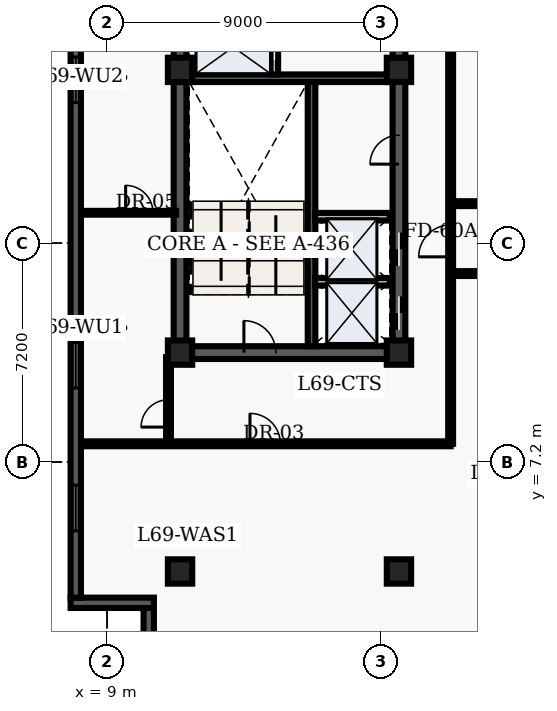
"""IFC4 building model, lengths in metres.
Left out: names, types, materials, properties, quantities, classifications, styles, units other than length and angle.
Written with IfcOpenShell. Run it as: python <this file> out.ifc"""

import sys

from ifc_helpers import new_model, entity, si_unit, converted_unit, direction, frame, origin_with_axes, origin_2d_with_axis, place, context, subcontext, project, spatial, polyline, rectangle, outline, extrude, element, fill, save


model = new_model("IFC4")
c1 = context("Model", 3, precision=1e-05, world=origin_with_axes(), true_north=direction((0.0, 1.0)))
c2 = subcontext(c1, "Body", "Model", "MODEL_VIEW")
j1 = project(units=[si_unit("LENGTHUNIT", "METRE"), converted_unit("PLANEANGLEUNIT", "DEGREE", entity("IfcPlaneAngleMeasure", 0.017), si_unit("PLANEANGLEUNIT", "RADIAN"), dimensions=[0, 0, 0, 0, 0, 0, 0])], contexts=[c1])
p1 = place(None, origin_with_axes())
s1 = spatial("IfcSite", under=j1, at=p1, CompositionType="ELEMENT")
p2 = place(p1, origin_with_axes())
s2 = spatial("IfcBuilding", under=s1, at=p2, CompositionType="ELEMENT")
p3 = place(p2, frame((0.0, 0.0, 280.2), z_axis=(0.0, 0.0, 1.0), x_axis=(1.0, 0.0, 0.0)))
s3 = spatial("IfcBuildingStorey", under=s2, at=p3, CompositionType="ELEMENT", Elevation=280.2)
p4 = place(p3, frame((11.4, 10.8, 0.0), z_axis=(0.0, 0.0, 1.0), x_axis=(0.0, 1.0, 0.0)))
e1 = element("IfcWall", 1, at=p4, inside=s3, PredefinedType="SHEAR", context=c2, shape_type="SweptSolid", body=[
    extrude(outline(polyline([(0.0, -0.21), (27.0, -0.21), (27.0, 0.21), (0.0, 0.21), (0.0, -0.21)])), origin_with_axes(), (0.0, 0.0, 1.0), 3.66),
])
p5 = place(p3, frame((11.4, 10.8, 0.0), z_axis=(0.0, 0.0, 1.0), x_axis=(1.0, 0.0, 0.0)))
e2 = element("IfcWall", 2, at=p5, inside=s3, PredefinedType="SHEAR", context=c2, shape_type="SweptSolid", body=[
    extrude(outline(polyline([(0.0, -0.21), (7.2, -0.21), (7.2, 0.21), (0.0, 0.21), (0.0, -0.21)])), origin_with_axes(), (0.0, 0.0, 1.0), 3.66),
])
p6 = place(p5, frame((2.625, 0.0, 0.0), z_axis=(0.0, 0.0, 1.0), x_axis=(1.0, 0.0, 0.0)))
e3 = element("IfcOpeningElement", 3, at=p6, cuts=e2, PredefinedType="OPENING", context=c2, shape_type="SweptSolid", body=[
    extrude(rectangle(XDim=1.05, YDim=0.44, at=origin_2d_with_axis()), origin_with_axes(), (0.0, 0.0, 1.0), 2.15),
])
p7 = place(p3, frame((18.6, 10.8, 0.0), z_axis=(0.0, 0.0, 1.0), x_axis=(0.0, 1.0, 0.0)))
e4 = element("IfcWall", 4, at=p7, inside=s3, PredefinedType="SHEAR", context=c2, shape_type="SweptSolid", body=[
    extrude(outline(polyline([(0.0, -0.21), (13.5, -0.21), (13.5, 0.21), (0.0, 0.21), (0.0, -0.21)])), origin_with_axes(), (0.0, 0.0, 1.0), 3.66),
])
p8 = place(p7, frame((1.3, 0.0, 0.0), z_axis=(0.0, 0.0, 1.0), x_axis=(1.0, 0.0, 0.0)))
e5 = element("IfcOpeningElement", 5, at=p8, cuts=e4, PredefinedType="OPENING", context=c2, shape_type="SweptSolid", body=[
    extrude(rectangle(XDim=1.1, YDim=0.44, at=origin_2d_with_axis()), origin_with_axes(), (0.0, 0.0, 1.0), 2.15),
])
p9 = place(p7, frame((3.4, 0.0, 0.0), z_axis=(0.0, 0.0, 1.0), x_axis=(1.0, 0.0, 0.0)))
e6 = element("IfcOpeningElement", 6, at=p9, cuts=e4, PredefinedType="OPENING", context=c2, shape_type="SweptSolid", body=[
    extrude(rectangle(XDim=1.1, YDim=0.44, at=origin_2d_with_axis()), origin_with_axes(), (0.0, 0.0, 1.0), 2.15),
])
p10 = place(p7, frame((11.125, 0.0, 0.0), z_axis=(0.0, 0.0, 1.0), x_axis=(1.0, 0.0, 0.0)))
e7 = element("IfcOpeningElement", 7, at=p10, cuts=e4, PredefinedType="OPENING", context=c2, shape_type="SweptSolid", body=[
    extrude(rectangle(XDim=1.05, YDim=0.44, at=origin_2d_with_axis()), origin_with_axes(), (0.0, 0.0, 1.0), 2.15),
])
p11 = place(p7, frame((6.675, 0.0, 0.0), z_axis=(0.0, 0.0, 1.0), x_axis=(1.0, 0.0, 0.0)))
e8 = element("IfcOpeningElement", 8, at=p11, cuts=e4, PredefinedType="OPENING", context=c2, shape_type="SweptSolid", body=[
    extrude(rectangle(XDim=0.95, YDim=0.44, at=origin_2d_with_axis()), origin_with_axes(), (0.0, 0.0, 1.0), 2.15),
])
p12 = place(p3, frame((15.725, 11.01, 0.0), z_axis=(0.0, 0.0, 1.0), x_axis=(0.0, 1.0, 0.0)))
e9 = element("IfcWall", 9, at=p12, inside=s3, PredefinedType="SHEAR", context=c2, shape_type="SweptSolid", body=[
    extrude(outline(polyline([(0.0, -0.125), (8.69, -0.125), (8.69, 0.125), (0.0, 0.125), (0.0, -0.125)])), origin_with_axes(), (0.0, 0.0, 1.0), 3.66),
])
p13 = place(p3, frame((11.61, 19.825, 0.0), z_axis=(0.0, 0.0, 1.0), x_axis=(1.0, 0.0, 0.0)))
e10 = element("IfcWall", 10, at=p13, inside=s3, PredefinedType="SHEAR", context=c2, shape_type="SweptSolid", body=[
    extrude(outline(polyline([(0.0, -0.125), (6.78, -0.125), (6.78, 0.125), (0.0, 0.125), (0.0, -0.125)])), origin_with_axes(), (0.0, 0.0, 1.0), 3.66),
])
p14 = place(p3, frame((14.5, 19.95, 0.0), z_axis=(0.0, 0.0, 1.0), x_axis=(0.0, 1.0, 0.0)))
e11 = element("IfcWall", 11, at=p14, inside=s3, PredefinedType="SOLIDWALL", context=c2, shape_type="SweptSolid", body=[
    extrude(outline(polyline([(0.0, -0.125), (6.25, -0.125), (6.25, 0.125), (0.0, 0.125), (0.0, -0.125)])), origin_with_axes(), (0.0, 0.0, 1.0), 2.7),
])
p15 = place(p14, frame((1.025, 0.0, 0.0), z_axis=(0.0, 0.0, 1.0), x_axis=(1.0, 0.0, 0.0)))
e12 = element("IfcOpeningElement", 12, at=p15, cuts=e11, PredefinedType="OPENING", context=c2, shape_type="SweptSolid", body=[
    extrude(rectangle(XDim=1.1, YDim=0.27, at=origin_2d_with_axis()), origin_with_axes(), (0.0, 0.0, 1.0), 2.15),
])
p16 = place(p14, frame((2.975, 0.0, 0.0), z_axis=(0.0, 0.0, 1.0), x_axis=(1.0, 0.0, 0.0)))
e13 = element("IfcOpeningElement", 13, at=p16, cuts=e11, PredefinedType="OPENING", context=c2, shape_type="SweptSolid", body=[
    extrude(rectangle(XDim=1.1, YDim=0.27, at=origin_2d_with_axis()), origin_with_axes(), (0.0, 0.0, 1.0), 2.15),
])
p17 = place(p14, frame((5.425, 0.0, 0.0), z_axis=(0.0, 0.0, 1.0), x_axis=(1.0, 0.0, 0.0)))
e14 = element("IfcOpeningElement", 14, at=p17, cuts=e11, PredefinedType="OPENING", context=c2, shape_type="SweptSolid", body=[
    extrude(rectangle(XDim=1.2, YDim=0.27, at=origin_2d_with_axis()), origin_with_axes(), (0.0, 0.0, 1.0), 2.15),
])
for number, where, z_axis, x_axis in (
    (15, (11.4, 3.6, 0.0), (0.0, 0.0, 1.0), (1.0, 0.0, 0.0)),
    (16, (11.4, 10.8, 0.0), (0.0, 0.0, 1.0), (1.0, 0.0, 0.0)),
    (17, (11.4, 20.1, 0.0), (0.0, 0.0, 1.0), (1.0, 0.0, 0.0)),
    (18, (18.6, 3.6, 0.0), (0.0, 0.0, 1.0), (1.0, 0.0, 0.0)),
    (19, (18.6, 10.8, 0.0), (0.0, 0.0, 1.0), (1.0, 0.0, 0.0)),
    (20, (18.6, 20.1, 0.0), (0.0, 0.0, 1.0), (1.0, 0.0, 0.0)),
):
    element("IfcColumn", number, at=place(p3, frame(where, z_axis=z_axis, x_axis=x_axis)), inside=s3, PredefinedType="COLUMN", context=c2, shape_type="SweptSolid", body=[
        extrude(rectangle(XDim=0.8, YDim=0.8, at=origin_2d_with_axis()), origin_with_axes(), (0.0, 0.0, 1.0), 3.9),
    ])
for number, where, z_axis, x_axis in (
    (21, (15.84, 13.13, 0.0), (0.0, 0.0, 1.0), (1.0, 0.0, 0.0)),
    (22, (15.84, 15.27, 0.0), (0.0, 0.0, 1.0), (1.0, 0.0, 0.0)),
):
    element("IfcWall", number, at=place(p3, frame(where, z_axis=z_axis, x_axis=x_axis)), inside=s3, PredefinedType="SOLIDWALL", context=c2, shape_type="SweptSolid", body=[
        extrude(outline(polyline([(0.0, -0.125), (2.46, -0.125), (2.46, 0.125), (0.0, 0.125), (0.0, -0.125)])), origin_with_axes(), (0.0, 0.0, 1.0), 2.7),
    ])
p18 = place(p3, frame((8.135, 7.8, 0.0), z_axis=(0.0, 0.0, 1.0), x_axis=(1.0, 0.0, 0.0)))
e23 = element("IfcWall", 23, at=p18, inside=s3, PredefinedType="PARTITIONING", context=c2, shape_type="SweptSolid", body=[
    extrude(outline(polyline([(0.0, -0.08), (12.165, -0.08), (12.165, 0.08), (0.0, 0.08), (0.0, -0.08)])), origin_with_axes(), (0.0, 0.0, 1.0), 2.7),
])
p19 = place(p18, frame((6.065, 0.0, 0.0), z_axis=(0.0, 0.0, 1.0), x_axis=(1.0, 0.0, 0.0)))
e24 = element("IfcOpeningElement", 24, at=p19, cuts=e23, PredefinedType="OPENING", context=c2, shape_type="SweptSolid", body=[
    extrude(rectangle(XDim=1.0, YDim=0.18, at=origin_2d_with_axis()), origin_with_axes(), (0.0, 0.0, 1.0), 2.15),
])
p20 = place(p3, frame((20.3, 7.8, 0.0), z_axis=(0.0, 0.0, 1.0), x_axis=(0.0, 1.0, 0.0)))
e25 = element("IfcWall", 25, at=p20, inside=s3, PredefinedType="PARTITIONING", context=c2, shape_type="SweptSolid", body=[
    extrude(outline(polyline([(0.0, -0.08), (32.7, -0.08), (32.7, 0.08), (0.0, 0.08), (0.0, -0.08)])), origin_with_axes(), (0.0, 0.0, 1.0), 2.7),
])
p21 = place(p20, frame((14.2, 0.0, 0.0), z_axis=(0.0, 0.0, 1.0), x_axis=(1.0, 0.0, 0.0)))
e26 = element("IfcOpeningElement", 26, at=p21, cuts=e25, PredefinedType="OPENING", context=c2, shape_type="SweptSolid", body=[
    extrude(rectangle(XDim=1.0, YDim=0.18, at=origin_2d_with_axis()), origin_with_axes(), (0.0, 0.0, 1.0), 2.15),
])
p22 = place(p20, frame((18.24, 0.0, 0.0), z_axis=(0.0, 0.0, 1.0), x_axis=(1.0, 0.0, 0.0)))
e27 = element("IfcOpeningElement", 27, at=p22, cuts=e25, PredefinedType="OPENING", context=c2, shape_type="SweptSolid", body=[
    extrude(rectangle(XDim=1.0, YDim=0.18, at=origin_2d_with_axis()), origin_with_axes(), (0.0, 0.0, 1.0), 2.15),
])
p23 = place(p20, frame((22.011, 0.0, 0.0), z_axis=(0.0, 0.0, 1.0), x_axis=(1.0, 0.0, 0.0)))
e28 = element("IfcOpeningElement", 28, at=p23, cuts=e25, PredefinedType="OPENING", context=c2, shape_type="SweptSolid", body=[
    extrude(rectangle(XDim=1.0, YDim=0.18, at=origin_2d_with_axis()), origin_with_axes(), (0.0, 0.0, 1.0), 2.15),
])
p24 = place(p20, frame((25.672, 0.0, 0.0), z_axis=(0.0, 0.0, 1.0), x_axis=(1.0, 0.0, 0.0)))
e29 = element("IfcOpeningElement", 29, at=p24, cuts=e25, PredefinedType="OPENING", context=c2, shape_type="SweptSolid", body=[
    extrude(rectangle(XDim=1.0, YDim=0.18, at=origin_2d_with_axis()), origin_with_axes(), (0.0, 0.0, 1.0), 2.15),
])
p25 = place(p20, frame((6.675, 0.0, 0.0), z_axis=(0.0, 0.0, 1.0), x_axis=(1.0, 0.0, 0.0)))
e30 = element("IfcOpeningElement", 30, at=p25, cuts=e25, PredefinedType="OPENING", context=c2, shape_type="SweptSolid", body=[
    extrude(rectangle(XDim=1.05, YDim=0.18, at=origin_2d_with_axis()), origin_with_axes(), (0.0, 0.0, 1.0), 2.15),
])
p26 = place(p3, frame((11.02, 7.8, 0.0), z_axis=(0.0, 0.0, 1.0), x_axis=(0.0, 1.0, 0.0)))
e31 = element("IfcWall", 31, at=p26, inside=s3, PredefinedType="PARTITIONING", context=c2, shape_type="SweptSolid", body=[
    extrude(outline(polyline([(0.0, -0.08), (2.85, -0.08), (2.85, 0.08), (0.0, 0.08), (0.0, -0.08)])), origin_with_axes(), (0.0, 0.0, 1.0), 2.7),
])
p27 = place(p26, frame((1.0, 0.0, 0.0), z_axis=(0.0, 0.0, 1.0), x_axis=(1.0, 0.0, 0.0)))
e32 = element("IfcOpeningElement", 32, at=p27, cuts=e31, PredefinedType="OPENING", context=c2, shape_type="SweptSolid", body=[
    extrude(rectangle(XDim=0.9, YDim=0.18, at=origin_2d_with_axis()), origin_with_axes(), (0.0, 0.0, 1.0), 2.15),
])
p28 = place(p3, frame((8.135, 15.4, 0.0), z_axis=(0.0, 0.0, 1.0), x_axis=(1.0, 0.0, 0.0)))
e33 = element("IfcWall", 33, at=p28, inside=s3, PredefinedType="PARTITIONING", context=c2, shape_type="SweptSolid", body=[
    extrude(outline(polyline([(0.0, -0.062), (3.135, -0.062), (3.135, 0.062), (0.0, 0.062), (0.0, -0.062)])), origin_with_axes(), (0.0, 0.0, 1.0), 2.7),
])
p29 = place(p28, frame((1.925, 0.0, 0.0), z_axis=(0.0, 0.0, 1.0), x_axis=(1.0, 0.0, 0.0)))
e34 = element("IfcOpeningElement", 34, at=p29, cuts=e33, PredefinedType="OPENING", context=c2, shape_type="SweptSolid", body=[
    extrude(rectangle(XDim=0.9, YDim=0.145, at=origin_2d_with_axis()), origin_with_axes(), (0.0, 0.0, 1.0), 2.15),
])
p30 = place(p3, frame((20.3, 13.4, 0.0), z_axis=(0.0, 0.0, 1.0), x_axis=(1.0, 0.0, 0.0)))
e35 = element("IfcWall", 35, at=p30, inside=s3, PredefinedType="PARTITIONING", context=c2, shape_type="SweptSolid", body=[
    extrude(outline(polyline([(0.0, -0.08), (15.45, -0.08), (15.45, 0.08), (0.0, 0.08), (0.0, -0.08)])), origin_with_axes(), (0.0, 0.0, 1.0), 2.7),
])
p31 = place(p30, frame((2.304, 0.0, 0.0), z_axis=(0.0, 0.0, 1.0), x_axis=(1.0, 0.0, 0.0)))
e36 = element("IfcOpeningElement", 36, at=p31, cuts=e35, PredefinedType="OPENING", context=c2, shape_type="SweptSolid", body=[
    extrude(rectangle(XDim=1.0, YDim=0.18, at=origin_2d_with_axis()), origin_with_axes(), (0.0, 0.0, 1.0), 2.15),
])
p32 = place(p30, frame((6.866, 0.0, 0.0), z_axis=(0.0, 0.0, 1.0), x_axis=(1.0, 0.0, 0.0)))
e37 = element("IfcOpeningElement", 37, at=p32, cuts=e35, PredefinedType="OPENING", context=c2, shape_type="SweptSolid", body=[
    extrude(rectangle(XDim=1.0, YDim=0.18, at=origin_2d_with_axis()), origin_with_axes(), (0.0, 0.0, 1.0), 2.15),
])
p33 = place(p30, frame((12.337, 0.0, 0.0), z_axis=(0.0, 0.0, 1.0), x_axis=(1.0, 0.0, 0.0)))
e38 = element("IfcOpeningElement", 38, at=p33, cuts=e35, PredefinedType="OPENING", context=c2, shape_type="SweptSolid", body=[
    extrude(rectangle(XDim=1.2, YDim=0.18, at=origin_2d_with_axis()), origin_with_axes(), (0.0, 0.0, 1.0), 2.2),
])
p34 = place(p3, frame((20.3, 15.7, 0.0), z_axis=(0.0, 0.0, 1.0), x_axis=(1.0, 0.0, 0.0)))
e39 = element("IfcWall", 39, at=p34, inside=s3, PredefinedType="PARTITIONING", context=c2, shape_type="SweptSolid", body=[
    extrude(outline(polyline([(0.0, -0.08), (15.45, -0.08), (15.45, 0.08), (0.0, 0.08), (0.0, -0.08)])), origin_with_axes(), (0.0, 0.0, 1.0), 2.7),
])
p35 = place(p34, frame((7.775, 0.0, 0.0), z_axis=(0.0, 0.0, 1.0), x_axis=(1.0, 0.0, 0.0)))
e40 = element("IfcOpeningElement", 40, at=p35, cuts=e39, PredefinedType="OPENING", context=c2, shape_type="SweptSolid", body=[
    extrude(rectangle(XDim=1.0, YDim=0.18, at=origin_2d_with_axis()), origin_with_axes(), (0.0, 0.0, 1.0), 2.15),
])
p36 = place(p3, frame((10.37, 0.34, 0.0), z_axis=(0.0, 0.0, 1.0), x_axis=(0.0, 1.0, 0.0)))
e41 = element("IfcWall", 41, at=p36, inside=s3, PredefinedType="SOLIDWALL", context=c2, shape_type="SweptSolid", body=[
    extrude(outline(polyline([(0.0, -0.17), (2.06, -0.17), (2.06, 0.17), (0.0, 0.17), (0.0, -0.17)])), origin_with_axes(), (0.0, 0.0, 1.0), 3.66),
])
p37 = place(p3, frame((10.54, 2.57, 0.0), z_axis=(0.0, 0.0, 1.0), x_axis=(-1.0, 0.0, 0.0)))
e42 = element("IfcWall", 42, at=p37, inside=s3, PredefinedType="SOLIDWALL", context=c2, shape_type="SweptSolid", body=[
    extrude(outline(polyline([(0.0, -0.17), (2.74, -0.17), (2.74, 0.17), (0.0, 0.17), (0.0, -0.17)])), origin_with_axes(), (0.0, 0.0, 1.0), 3.66),
])
p38 = place(p3, frame((7.97, 2.74, 0.0), z_axis=(0.0, 0.0, 1.0), x_axis=(0.0, 1.0, 0.0)))
e43 = element("IfcWall", 43, at=p38, inside=s3, PredefinedType="SOLIDWALL", context=c2, shape_type="SweptSolid", body=[
    extrude(outline(polyline([(0.0, -0.17), (43.46, -0.17), (43.46, 0.17), (0.0, 0.17), (0.0, -0.17)])), origin_with_axes(), (0.0, 0.0, 1.0), 3.66),
])
p39 = place(p38, frame((2.948, 0.0, 0.45), z_axis=(0.0, 0.0, 1.0), x_axis=(1.0, 0.0, 0.0)))
e44 = element("IfcOpeningElement", 44, at=p39, cuts=e43, PredefinedType="OPENING", context=c2, shape_type="SweptSolid", body=[
    extrude(rectangle(XDim=1.5, YDim=0.36, at=origin_2d_with_axis()), origin_with_axes(), (0.0, 0.0, 1.0), 2.1),
])
p40 = place(p38, frame((7.643, 0.0, 0.45), z_axis=(0.0, 0.0, 1.0), x_axis=(1.0, 0.0, 0.0)))
e45 = element("IfcOpeningElement", 45, at=p40, cuts=e43, PredefinedType="OPENING", context=c2, shape_type="SweptSolid", body=[
    extrude(rectangle(XDim=1.5, YDim=0.36, at=origin_2d_with_axis()), origin_with_axes(), (0.0, 0.0, 1.0), 2.1),
])
p41 = place(p38, frame((17.034, 0.0, 0.45), z_axis=(0.0, 0.0, 1.0), x_axis=(1.0, 0.0, 0.0)))
e46 = element("IfcOpeningElement", 46, at=p41, cuts=e43, PredefinedType="OPENING", context=c2, shape_type="SweptSolid", body=[
    extrude(rectangle(XDim=1.5, YDim=0.36, at=origin_2d_with_axis()), origin_with_axes(), (0.0, 0.0, 1.0), 2.1),
])
p42 = place(p38, frame((26.426, 0.0, 0.45), z_axis=(0.0, 0.0, 1.0), x_axis=(1.0, 0.0, 0.0)))
e47 = element("IfcOpeningElement", 47, at=p42, cuts=e43, PredefinedType="OPENING", context=c2, shape_type="SweptSolid", body=[
    extrude(rectangle(XDim=1.5, YDim=0.36, at=origin_2d_with_axis()), origin_with_axes(), (0.0, 0.0, 1.0), 2.1),
])
p43 = place(p38, frame((31.571, 0.0, 0.45), z_axis=(0.0, 0.0, 1.0), x_axis=(1.0, 0.0, 0.0)))
e48 = element("IfcOpeningElement", 48, at=p43, cuts=e43, PredefinedType="OPENING", context=c2, shape_type="SweptSolid", body=[
    extrude(rectangle(XDim=1.5, YDim=0.36, at=origin_2d_with_axis()), origin_with_axes(), (0.0, 0.0, 1.0), 2.1),
])
p44 = place(p38, frame((35.817, 0.0, 0.45), z_axis=(0.0, 0.0, 1.0), x_axis=(1.0, 0.0, 0.0)))
e49 = element("IfcOpeningElement", 49, at=p44, cuts=e43, PredefinedType="OPENING", context=c2, shape_type="SweptSolid", body=[
    extrude(rectangle(XDim=1.5, YDim=0.36, at=origin_2d_with_axis()), origin_with_axes(), (0.0, 0.0, 1.0), 2.1),
])
p45 = place(p38, frame((40.512, 0.0, 0.45), z_axis=(0.0, 0.0, 1.0), x_axis=(1.0, 0.0, 0.0)))
e50 = element("IfcOpeningElement", 50, at=p45, cuts=e43, PredefinedType="OPENING", context=c2, shape_type="SweptSolid", body=[
    extrude(rectangle(XDim=1.5, YDim=0.36, at=origin_2d_with_axis()), origin_with_axes(), (0.0, 0.0, 1.0), 2.1),
])
p46 = place(p7, frame((1.3, 0.0, 0.0), z_axis=(0.0, 0.0, 1.0), x_axis=(1.0, 0.0, 0.0)))
e51 = element("IfcDoor", 51, at=p46, inside=s3, OperationType="SLIDING_TO_LEFT", PredefinedType="DOOR", context=c2, shape_type="SweptSolid", body=[
    extrude(rectangle(XDim=1.1, YDim=0.09, at=origin_2d_with_axis()), origin_with_axes(), (0.0, 0.0, 1.0), 2.15),
])
fill(e5, e51)
p47 = place(p7, frame((3.4, 0.0, 0.0), z_axis=(0.0, 0.0, 1.0), x_axis=(1.0, 0.0, 0.0)))
e52 = element("IfcDoor", 52, at=p47, inside=s3, OperationType="SLIDING_TO_RIGHT", PredefinedType="DOOR", context=c2, shape_type="SweptSolid", body=[
    extrude(rectangle(XDim=1.1, YDim=0.09, at=origin_2d_with_axis()), origin_with_axes(), (0.0, 0.0, 1.0), 2.15),
])
fill(e6, e52)
p48 = place(p14, frame((1.025, 0.0, 0.0), z_axis=(0.0, 0.0, 1.0), x_axis=(1.0, 0.0, 0.0)))
e53 = element("IfcDoor", 53, at=p48, inside=s3, OperationType="SLIDING_TO_LEFT", PredefinedType="DOOR", context=c2, shape_type="SweptSolid", body=[
    extrude(rectangle(XDim=1.1, YDim=0.09, at=origin_2d_with_axis()), origin_with_axes(), (0.0, 0.0, 1.0), 2.15),
])
fill(e12, e53)
p49 = place(p5, frame((2.625, 0.0, 0.0), z_axis=(0.0, 0.0, 1.0), x_axis=(1.0, 0.0, 0.0)))
e54 = element("IfcDoor", 54, at=p49, inside=s3, OperationType="SINGLE_SWING_LEFT", PredefinedType="DOOR", context=c2, shape_type="SweptSolid", body=[
    extrude(rectangle(XDim=1.05, YDim=0.09, at=origin_2d_with_axis()), origin_with_axes(), (0.0, 0.0, 1.0), 2.15),
])
fill(e3, e54)
p50 = place(p7, frame((6.675, 0.0, 0.0), z_axis=(0.0, 0.0, 1.0), x_axis=(1.0, 0.0, 0.0)))
e55 = element("IfcDoor", 55, at=p50, inside=s3, OperationType="SINGLE_SWING_LEFT", PredefinedType="DOOR", context=c2, shape_type="SweptSolid", body=[
    extrude(rectangle(XDim=0.95, YDim=0.09, at=origin_2d_with_axis()), origin_with_axes(), (0.0, 0.0, 1.0), 2.15),
])
fill(e8, e55)
p51 = place(p28, frame((1.925, 0.0, 0.0), z_axis=(0.0, 0.0, 1.0), x_axis=(1.0, 0.0, 0.0)))
e56 = element("IfcDoor", 56, at=p51, inside=s3, OperationType="SINGLE_SWING_LEFT", PredefinedType="DOOR", context=c2, shape_type="SweptSolid", body=[
    extrude(rectangle(XDim=0.9, YDim=0.075, at=origin_2d_with_axis()), origin_with_axes(), (0.0, 0.0, 1.0), 2.15),
])
fill(e34, e56)
p52 = place(p26, frame((1.0, 0.0, 0.0), z_axis=(0.0, 0.0, 1.0), x_axis=(1.0, 0.0, 0.0)))
e57 = element("IfcDoor", 57, at=p52, inside=s3, OperationType="SINGLE_SWING_LEFT", PredefinedType="DOOR", context=c2, shape_type="SweptSolid", body=[
    extrude(rectangle(XDim=0.9, YDim=0.09, at=origin_2d_with_axis()), origin_with_axes(), (0.0, 0.0, 1.0), 2.15),
])
fill(e32, e57)
p53 = place(p18, frame((6.065, 0.0, 0.0), z_axis=(0.0, 0.0, 1.0), x_axis=(1.0, 0.0, 0.0)))
e58 = element("IfcDoor", 58, at=p53, inside=s3, OperationType="SINGLE_SWING_LEFT", PredefinedType="DOOR", context=c2, shape_type="SweptSolid", body=[
    extrude(rectangle(XDim=1.0, YDim=0.09, at=origin_2d_with_axis()), origin_with_axes(), (0.0, 0.0, 1.0), 2.15),
])
fill(e24, e58)
p54 = place(p20, frame((6.675, 0.0, 0.0), z_axis=(0.0, 0.0, 1.0), x_axis=(1.0, 0.0, 0.0)))
e59 = element("IfcDoor", 59, at=p54, inside=s3, OperationType="SINGLE_SWING_LEFT", PredefinedType="DOOR", context=c2, shape_type="SweptSolid", body=[
    extrude(rectangle(XDim=1.05, YDim=0.09, at=origin_2d_with_axis()), origin_with_axes(), (0.0, 0.0, 1.0), 2.15),
])
fill(e30, e59)
p55 = place(p38, frame((2.948, 0.0, 0.45), z_axis=(0.0, 0.0, 1.0), x_axis=(1.0, 0.0, 0.0)))
e60 = element("IfcWindow", 60, at=p55, inside=s3, PredefinedType="WINDOW", context=c2, shape_type="SweptSolid", body=[
    extrude(rectangle(XDim=1.5, YDim=0.09, at=origin_2d_with_axis()), origin_with_axes(), (0.0, 0.0, 1.0), 2.1),
])
fill(e44, e60)
p56 = place(p38, frame((7.643, 0.0, 0.45), z_axis=(0.0, 0.0, 1.0), x_axis=(1.0, 0.0, 0.0)))
e61 = element("IfcWindow", 61, at=p56, inside=s3, PredefinedType="WINDOW", context=c2, shape_type="SweptSolid", body=[
    extrude(rectangle(XDim=1.5, YDim=0.09, at=origin_2d_with_axis()), origin_with_axes(), (0.0, 0.0, 1.0), 2.1),
])
fill(e45, e61)
p57 = place(p38, frame((17.034, 0.0, 0.45), z_axis=(0.0, 0.0, 1.0), x_axis=(1.0, 0.0, 0.0)))
e62 = element("IfcWindow", 62, at=p57, inside=s3, PredefinedType="WINDOW", context=c2, shape_type="SweptSolid", body=[
    extrude(rectangle(XDim=1.5, YDim=0.09, at=origin_2d_with_axis()), origin_with_axes(), (0.0, 0.0, 1.0), 2.1),
])
fill(e46, e62)
save(model, sys.argv[1])
